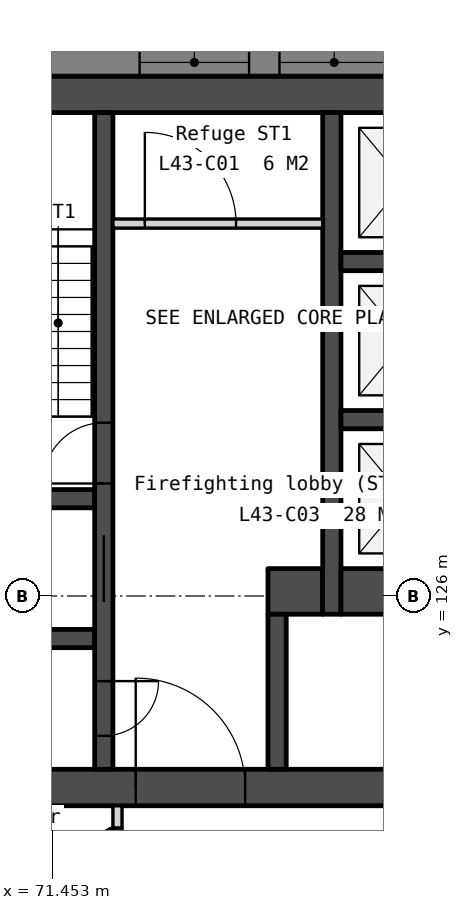
"""IFC4 building model, lengths in metres.
Left out: names, types, materials, properties, quantities, classifications, styles, units other than length and angle.
Written with IfcOpenShell. Run it as: python <this file> out.ifc"""

import sys

from ifc_helpers import new_model, si_unit, direction, frame, frame_2d, origin, place, context, subcontext, project, spatial, polyline, rectangle, outline, extrude, element, fill, save


model = new_model("IFC4")
c1 = context("Model", 3, precision=1e-05, world=origin(), true_north=direction((0.0, 1.0)))
c2 = subcontext(c1, "Body", "Model", "MODEL_VIEW")
j1 = project(units=[si_unit("LENGTHUNIT", "METRE"), si_unit("PLANEANGLEUNIT", "RADIAN")], contexts=[c1])
p1 = place(None, origin())
s1 = spatial("IfcSite", under=j1, at=p1, CompositionType="ELEMENT")
p2 = place(p1, origin())
s2 = spatial("IfcBuilding", under=s1, at=p2, CompositionType="ELEMENT")
p3 = place(p2, frame((0.0, 0.0, 171.5)))
s3 = spatial("IfcBuildingStorey", under=s2, at=p3, CompositionType="ELEMENT", Elevation=171.5)
p4 = place(p3, frame((69.0, 134.25, 0.0), z_axis=(0.0, 0.0, 1.0), x_axis=(1.0, 0.0, 0.0)))
e1 = element("IfcWall", 1, at=p4, inside=s3, PredefinedType="SOLIDWALL", context=c2, shape_type="SweptSolid", body=[
    extrude(rectangle(XDim=22.0, YDim=0.6, at=frame_2d((11.0, 0.0))), origin(), (0.0, 0.0, 1.0), 3.65),
])
p5 = place(p3, frame((69.0, 122.85, 0.0), z_axis=(0.0, 0.0, 1.0), x_axis=(1.0, 0.0, 0.0)))
e2 = element("IfcWall", 2, at=p5, inside=s3, PredefinedType="SOLIDWALL", context=c2, shape_type="SweptSolid", body=[
    extrude(rectangle(XDim=22.0, YDim=0.6, at=frame_2d((11.0, 0.0))), origin(), (0.0, 0.0, 1.0), 3.65),
])
p6 = place(p5, frame((16.375, 0.0, 0.0)))
e3 = element("IfcOpeningElement", 3, at=p6, cuts=e2, PredefinedType="OPENING", context=c2, shape_type="SweptSolid", body=[
    extrude(rectangle(XDim=1.8, YDim=2.1, at=frame_2d((0.9, 1.05))), frame((0.0, 0.31, 0.0), z_axis=(0.0, -1.0, 0.0), x_axis=(1.0, 0.0, 0.0)), (0.0, 0.0, 1.0), 0.62),
])
p7 = place(p5, frame((3.825, 0.0, 0.0)))
e4 = element("IfcOpeningElement", 4, at=p7, cuts=e2, PredefinedType="OPENING", context=c2, shape_type="SweptSolid", body=[
    extrude(rectangle(XDim=1.8, YDim=2.1, at=frame_2d((0.9, 1.05))), frame((0.0, 0.31, 0.0), z_axis=(0.0, -1.0, 0.0), x_axis=(1.0, 0.0, 0.0)), (0.0, 0.0, 1.0), 0.62),
])
p8 = place(p5, frame((12.85, 0.0, 0.0)))
e5 = element("IfcOpeningElement", 5, at=p8, cuts=e2, PredefinedType="OPENING", context=c2, shape_type="SweptSolid", body=[
    extrude(rectangle(XDim=1.5, YDim=2.1, at=frame_2d((0.75, 1.05))), frame((0.0, 0.31, 0.0), z_axis=(0.0, -1.0, 0.0), x_axis=(1.0, 0.0, 0.0)), (0.0, 0.0, 1.0), 0.62),
])
for number, where, z_axis, x_axis in (
    (6, (69.6, 127.6, 0.0), (0.0, 0.0, 1.0), (1.0, 0.0, 0.0)),
    (7, (69.6, 125.3, 0.0), (0.0, 0.0, 1.0), (1.0, 0.0, 0.0)),
):
    element("IfcWall", number, at=place(p3, frame(where, z_axis=z_axis, x_axis=x_axis)), inside=s3, PredefinedType="SOLIDWALL", context=c2, shape_type="SweptSolid", body=[
        extrude(rectangle(XDim=2.55, YDim=0.3, at=frame_2d((1.275, 0.0))), origin(), (0.0, 0.0, 1.0), 3.65),
    ])
p9 = place(p3, frame((72.3, 133.95, 0.0), z_axis=(0.0, 0.0, 1.0), x_axis=(0.0, -1.0, 0.0)))
e8 = element("IfcWall", 8, at=p9, inside=s3, PredefinedType="SOLIDWALL", context=c2, shape_type="SweptSolid", body=[
    extrude(rectangle(XDim=10.8, YDim=0.3, at=frame_2d((5.4, 0.0))), origin(), (0.0, 0.0, 1.0), 3.65),
])
p10 = place(p9, frame((6.95, 0.0, 0.0)))
e9 = element("IfcOpeningElement", 9, at=p10, cuts=e8, PredefinedType="OPENING", context=c2, shape_type="SweptSolid", body=[
    extrude(rectangle(XDim=1.1, YDim=2.1, at=frame_2d((0.55, 1.05))), frame((0.0, 0.16, 0.0), z_axis=(0.0, -1.0, 0.0), x_axis=(1.0, 0.0, 0.0)), (0.0, 0.0, 1.0), 0.32),
])
p11 = place(p9, frame((9.35, 0.0, 0.0)))
e10 = element("IfcOpeningElement", 10, at=p11, cuts=e8, PredefinedType="OPENING", context=c2, shape_type="SweptSolid", body=[
    extrude(rectangle(XDim=0.9, YDim=2.1, at=frame_2d((0.45, 1.05))), frame((0.0, 0.16, 0.0), z_axis=(0.0, -1.0, 0.0), x_axis=(1.0, 0.0, 0.0)), (0.0, 0.0, 1.0), 0.32),
])
p12 = place(p9, frame((5.1, 0.0, 0.0)))
e11 = element("IfcOpeningElement", 11, at=p12, cuts=e8, PredefinedType="OPENING", context=c2, shape_type="SweptSolid", body=[
    extrude(rectangle(XDim=1.0, YDim=2.1, at=frame_2d((0.5, 1.05))), frame((0.0, 0.16, 0.0), z_axis=(0.0, -1.0, 0.0), x_axis=(1.0, 0.0, 0.0)), (0.0, 0.0, 1.0), 0.32),
])
p13 = place(p3, frame((72.45, 132.125, 0.0), z_axis=(0.0, 0.0, 1.0), x_axis=(1.0, 0.0, 0.0)))
e12 = element("IfcWall", 12, at=p13, inside=s3, PredefinedType="PARTITIONING", context=c2, shape_type="SweptSolid", body=[
    extrude(rectangle(XDim=3.45, YDim=0.15, at=frame_2d((1.725, 0.0))), origin(), (0.0, 0.0, 1.0), 3.65),
])
p14 = place(p13, frame((0.525, 0.0, 0.0)))
e13 = element("IfcOpeningElement", 13, at=p14, cuts=e12, PredefinedType="OPENING", context=c2, shape_type="SweptSolid", body=[
    extrude(rectangle(XDim=1.5, YDim=2.1, at=frame_2d((0.75, 1.05))), frame((0.0, 0.085, 0.0), z_axis=(0.0, -1.0, 0.0), x_axis=(1.0, 0.0, 0.0)), (0.0, 0.0, 1.0), 0.17),
])
p15 = place(p3, frame((75.0, 126.075, 0.0), z_axis=(0.0, 0.0, 1.0), x_axis=(1.0, 0.0, 0.0)))
e14 = element("IfcWall", 14, at=p15, inside=s3, PredefinedType="SOLIDWALL", context=c2, shape_type="SweptSolid", body=[
    extrude(rectangle(XDim=0.9, YDim=0.75, at=frame_2d((0.45, 0.0))), origin(), (0.0, 0.0, 1.0), 3.65),
])
p16 = place(p3, frame((75.15, 125.7, 0.0), z_axis=(0.0, 0.0, 1.0), x_axis=(0.0, -1.0, 0.0)))
e15 = element("IfcWall", 15, at=p16, inside=s3, PredefinedType="SOLIDWALL", context=c2, shape_type="SweptSolid", body=[
    extrude(rectangle(XDim=2.55, YDim=0.3, at=frame_2d((1.275, 0.0))), origin(), (0.0, 0.0, 1.0), 3.65),
])
p17 = place(p3, frame((76.05, 133.95, 0.0), z_axis=(0.0, 0.0, 1.0), x_axis=(0.0, -1.0, 0.0)))
e16 = element("IfcWall", 16, at=p17, inside=s3, PredefinedType="SOLIDWALL", context=c2, shape_type="SweptSolid", body=[
    extrude(rectangle(XDim=8.25, YDim=0.3, at=frame_2d((4.125, 0.0))), origin(), (0.0, 0.0, 1.0), 3.65),
])
for number, where, z_axis, x_axis in (
    (17, (76.2, 131.5, 0.0), (0.0, 0.0, 1.0), (1.0, 0.0, 0.0)),
    (18, (76.2, 128.9, 0.0), (0.0, 0.0, 1.0), (1.0, 0.0, 0.0)),
):
    element("IfcWall", number, at=place(p3, frame(where, z_axis=z_axis, x_axis=x_axis)), inside=s3, PredefinedType="SOLIDWALL", context=c2, shape_type="SweptSolid", body=[
        extrude(rectangle(XDim=2.1, YDim=0.3, at=frame_2d((1.05, 0.0))), origin(), (0.0, 0.0, 1.0), 3.65),
    ])
p18 = place(p3, frame((76.2, 126.075, 0.0), z_axis=(0.0, 0.0, 1.0), x_axis=(1.0, 0.0, 0.0)))
e19 = element("IfcWall", 19, at=p18, inside=s3, PredefinedType="SOLIDWALL", context=c2, shape_type="SweptSolid", body=[
    extrude(rectangle(XDim=2.1, YDim=0.75, at=frame_2d((1.05, 0.0))), origin(), (0.0, 0.0, 1.0), 3.65),
])
p19 = place(p3, frame((100.243, 134.775, -0.15), z_axis=(0.0, 0.0, 1.0), x_axis=(-1.0, 0.0, 0.0)))
e20 = element("IfcWall", 20, at=p19, inside=s3, PredefinedType="SOLIDWALL", context=c2, shape_type="SweptSolid", body=[
    extrude(outline(polyline([(40.486, 0.0), (40.486, 3.8), (0.0, 3.8), (0.0, 0.0), (40.486, 0.0)])), frame((0.0, 0.225, 0.0), z_axis=(0.0, -1.0, 0.0), x_axis=(1.0, 0.0, 0.0)), (0.0, 0.0, 1.0), 0.45),
])
p20 = place(p19, frame((3.011, 0.0, 0.95)))
e21 = element("IfcOpeningElement", 21, at=p20, cuts=e20, PredefinedType="OPENING", context=c2, shape_type="SweptSolid", body=[
    extrude(rectangle(XDim=1.8, YDim=2.2, at=frame_2d((0.9, 1.1))), frame((0.0, 0.235, 0.0), z_axis=(0.0, -1.0, 0.0), x_axis=(1.0, 0.0, 0.0)), (0.0, 0.0, 1.0), 0.47),
])
p21 = place(p19, frame((5.311, 0.0, 0.95)))
e22 = element("IfcOpeningElement", 22, at=p21, cuts=e20, PredefinedType="OPENING", context=c2, shape_type="SweptSolid", body=[
    extrude(rectangle(XDim=1.8, YDim=2.2, at=frame_2d((0.9, 1.1))), frame((0.0, 0.235, 0.0), z_axis=(0.0, -1.0, 0.0), x_axis=(1.0, 0.0, 0.0)), (0.0, 0.0, 1.0), 0.47),
])
p22 = place(p19, frame((13.132, 0.0, 0.95)))
e23 = element("IfcOpeningElement", 23, at=p22, cuts=e20, PredefinedType="OPENING", context=c2, shape_type="SweptSolid", body=[
    extrude(rectangle(XDim=1.8, YDim=2.2, at=frame_2d((0.9, 1.1))), frame((0.0, 0.235, 0.0), z_axis=(0.0, -1.0, 0.0), x_axis=(1.0, 0.0, 0.0)), (0.0, 0.0, 1.0), 0.47),
])
p23 = place(p19, frame((15.432, 0.0, 0.95)))
e24 = element("IfcOpeningElement", 24, at=p23, cuts=e20, PredefinedType="OPENING", context=c2, shape_type="SweptSolid", body=[
    extrude(rectangle(XDim=1.8, YDim=2.2, at=frame_2d((0.9, 1.1))), frame((0.0, 0.235, 0.0), z_axis=(0.0, -1.0, 0.0), x_axis=(1.0, 0.0, 0.0)), (0.0, 0.0, 1.0), 0.47),
])
p24 = place(p19, frame((23.254, 0.0, 0.95)))
e25 = element("IfcOpeningElement", 25, at=p24, cuts=e20, PredefinedType="OPENING", context=c2, shape_type="SweptSolid", body=[
    extrude(rectangle(XDim=1.8, YDim=2.2, at=frame_2d((0.9, 1.1))), frame((0.0, 0.235, 0.0), z_axis=(0.0, -1.0, 0.0), x_axis=(1.0, 0.0, 0.0)), (0.0, 0.0, 1.0), 0.47),
])
p25 = place(p19, frame((25.554, 0.0, 0.95)))
e26 = element("IfcOpeningElement", 26, at=p25, cuts=e20, PredefinedType="OPENING", context=c2, shape_type="SweptSolid", body=[
    extrude(rectangle(XDim=1.8, YDim=2.2, at=frame_2d((0.9, 1.1))), frame((0.0, 0.235, 0.0), z_axis=(0.0, -1.0, 0.0), x_axis=(1.0, 0.0, 0.0)), (0.0, 0.0, 1.0), 0.47),
])
p26 = place(p19, frame((33.375, 0.0, 0.95)))
e27 = element("IfcOpeningElement", 27, at=p26, cuts=e20, PredefinedType="OPENING", context=c2, shape_type="SweptSolid", body=[
    extrude(rectangle(XDim=1.8, YDim=2.2, at=frame_2d((0.9, 1.1))), frame((0.0, 0.235, 0.0), z_axis=(0.0, -1.0, 0.0), x_axis=(1.0, 0.0, 0.0)), (0.0, 0.0, 1.0), 0.47),
])
p27 = place(p19, frame((35.675, 0.0, 0.95)))
e28 = element("IfcOpeningElement", 28, at=p27, cuts=e20, PredefinedType="OPENING", context=c2, shape_type="SweptSolid", body=[
    extrude(rectangle(XDim=1.8, YDim=2.2, at=frame_2d((0.9, 1.1))), frame((0.0, 0.235, 0.0), z_axis=(0.0, -1.0, 0.0), x_axis=(1.0, 0.0, 0.0)), (0.0, 0.0, 1.0), 0.47),
])
p28 = place(p3, frame((57.652, 131.129, -0.15), z_axis=(0.0, 0.0, 1.0), x_axis=(0.499997369791, -0.866026922331, 0.0)))
e29 = element("IfcWall", 29, at=p28, inside=s3, PredefinedType="SOLIDWALL", context=c2, shape_type="SweptSolid", body=[
    extrude(outline(polyline([(40.486, 0.0), (40.486, 3.8), (0.0, 3.8), (0.0, 0.0), (40.486, 0.0)])), frame((0.0, 0.225, 0.0), z_axis=(0.0, -1.0, 0.0), x_axis=(1.0, 0.0, 0.0)), (0.0, 0.0, 1.0), 0.45),
])
p29 = place(p28, frame((3.011, 0.0, 0.95)))
e30 = element("IfcOpeningElement", 30, at=p29, cuts=e29, PredefinedType="OPENING", context=c2, shape_type="SweptSolid", body=[
    extrude(rectangle(XDim=1.8, YDim=2.2, at=frame_2d((0.9, 1.1))), frame((0.0, 0.235, 0.0), z_axis=(0.0, -1.0, 0.0), x_axis=(1.0, 0.0, 0.0)), (0.0, 0.0, 1.0), 0.47),
])
p30 = place(p28, frame((5.311, 0.0, 0.95)))
e31 = element("IfcOpeningElement", 31, at=p30, cuts=e29, PredefinedType="OPENING", context=c2, shape_type="SweptSolid", body=[
    extrude(rectangle(XDim=1.8, YDim=2.2, at=frame_2d((0.9, 1.1))), frame((0.0, 0.235, 0.0), z_axis=(0.0, -1.0, 0.0), x_axis=(1.0, 0.0, 0.0)), (0.0, 0.0, 1.0), 0.47),
])
p31 = place(p28, frame((13.132, 0.0, 0.95)))
e32 = element("IfcOpeningElement", 32, at=p31, cuts=e29, PredefinedType="OPENING", context=c2, shape_type="SweptSolid", body=[
    extrude(rectangle(XDim=1.8, YDim=2.2, at=frame_2d((0.9, 1.1))), frame((0.0, 0.235, 0.0), z_axis=(0.0, -1.0, 0.0), x_axis=(1.0, 0.0, 0.0)), (0.0, 0.0, 1.0), 0.47),
])
p32 = place(p28, frame((15.432, 0.0, 0.95)))
e33 = element("IfcOpeningElement", 33, at=p32, cuts=e29, PredefinedType="OPENING", context=c2, shape_type="SweptSolid", body=[
    extrude(rectangle(XDim=1.8, YDim=2.2, at=frame_2d((0.9, 1.1))), frame((0.0, 0.235, 0.0), z_axis=(0.0, -1.0, 0.0), x_axis=(1.0, 0.0, 0.0)), (0.0, 0.0, 1.0), 0.47),
])
p33 = place(p28, frame((23.254, 0.0, 0.95)))
e34 = element("IfcOpeningElement", 34, at=p33, cuts=e29, PredefinedType="OPENING", context=c2, shape_type="SweptSolid", body=[
    extrude(rectangle(XDim=1.8, YDim=2.2, at=frame_2d((0.9, 1.1))), frame((0.0, 0.235, 0.0), z_axis=(0.0, -1.0, 0.0), x_axis=(1.0, 0.0, 0.0)), (0.0, 0.0, 1.0), 0.47),
])
p34 = place(p28, frame((25.554, 0.0, 0.95)))
e35 = element("IfcOpeningElement", 35, at=p34, cuts=e29, PredefinedType="OPENING", context=c2, shape_type="SweptSolid", body=[
    extrude(rectangle(XDim=1.8, YDim=2.2, at=frame_2d((0.9, 1.1))), frame((0.0, 0.235, 0.0), z_axis=(0.0, -1.0, 0.0), x_axis=(1.0, 0.0, 0.0)), (0.0, 0.0, 1.0), 0.47),
])
p35 = place(p28, frame((33.375, 0.0, 0.95)))
e36 = element("IfcOpeningElement", 36, at=p35, cuts=e29, PredefinedType="OPENING", context=c2, shape_type="SweptSolid", body=[
    extrude(rectangle(XDim=1.8, YDim=2.2, at=frame_2d((0.9, 1.1))), frame((0.0, 0.235, 0.0), z_axis=(0.0, -1.0, 0.0), x_axis=(1.0, 0.0, 0.0)), (0.0, 0.0, 1.0), 0.47),
])
p36 = place(p28, frame((35.675, 0.0, 0.95)))
e37 = element("IfcOpeningElement", 37, at=p36, cuts=e29, PredefinedType="OPENING", context=c2, shape_type="SweptSolid", body=[
    extrude(rectangle(XDim=1.8, YDim=2.2, at=frame_2d((0.9, 1.1))), frame((0.0, 0.235, 0.0), z_axis=(0.0, -1.0, 0.0), x_axis=(1.0, 0.0, 0.0)), (0.0, 0.0, 1.0), 0.47),
])
p37 = place(p3, frame((65.438, 118.093, 0.0), z_axis=(0.0, 0.0, 1.0), x_axis=(0.866029768103, 0.499992440702, 0.0)))
e38 = element("IfcWall", 38, at=p37, inside=s3, PredefinedType="PARTITIONING", context=c2, shape_type="SweptSolid", body=[
    extrude(rectangle(XDim=8.089, YDim=0.1, at=frame_2d((4.044, 0.0))), origin(), (0.0, 0.0, 1.0), 3.65),
])
p38 = place(p37, frame((3.594, 0.0, 0.0)))
e39 = element("IfcOpeningElement", 39, at=p38, cuts=e38, PredefinedType="OPENING", context=c2, shape_type="SweptSolid", body=[
    extrude(rectangle(XDim=0.9, YDim=2.1, at=frame_2d((0.45, 1.05))), frame((0.0, 0.06, 0.0), z_axis=(0.0, -1.0, 0.0), x_axis=(1.0, 0.0, 0.0)), (0.0, 0.0, 1.0), 0.12),
])
p39 = place(p3, frame((72.525, 119.875, 0.0), z_axis=(0.0, 0.0, 1.0), x_axis=(0.0, 1.0, 0.0)))
e40 = element("IfcWall", 40, at=p39, inside=s3, PredefinedType="PARTITIONING", context=c2, shape_type="SweptSolid", body=[
    extrude(rectangle(XDim=2.31, YDim=0.15, at=frame_2d((1.155, 0.0))), origin(), (0.0, 0.0, 1.0), 3.65),
])
p40 = place(p3, frame((72.525, 122.185, 0.0), z_axis=(0.0, 0.0, 1.0), x_axis=(0.0, 1.0, 0.0)))
e41 = element("IfcWall", 41, at=p40, inside=s3, PredefinedType="PARTITIONING", context=c2, shape_type="SweptSolid", body=[
    extrude(rectangle(XDim=0.365, YDim=0.15, at=frame_2d((0.183, 0.0))), origin(), (0.0, 0.0, 1.0), 3.65),
])
p41 = place(p10, origin())
e42 = element("IfcDoor", 42, at=p41, inside=s3, OperationType="SLIDING_TO_LEFT", PredefinedType="DOOR", context=c2, shape_type="SweptSolid", body=[
    extrude(rectangle(XDim=1.1, YDim=2.1, at=frame_2d((0.55, 1.05))), frame((0.0, 0.025, 0.0), z_axis=(0.0, -1.0, 0.0), x_axis=(1.0, 0.0, 0.0)), (0.0, 0.0, 1.0), 0.05),
])
fill(e9, e42)
p42 = place(p7, origin())
e43 = element("IfcDoor", 43, at=p42, inside=s3, OperationType="DOUBLE_DOOR_DOUBLE_SWING", PredefinedType="DOOR", context=c2, shape_type="SweptSolid", body=[
    extrude(rectangle(XDim=1.8, YDim=2.1, at=frame_2d((0.9, 1.05))), frame((0.0, 0.025, 0.0), z_axis=(0.0, -1.0, 0.0), x_axis=(1.0, 0.0, 0.0)), (0.0, 0.0, 1.0), 0.05),
])
fill(e4, e43)
p43 = place(p14, origin())
e44 = element("IfcDoor", 44, at=p43, inside=s3, OperationType="DOUBLE_DOOR_DOUBLE_SWING", PredefinedType="DOOR", context=c2, shape_type="SweptSolid", body=[
    extrude(rectangle(XDim=1.5, YDim=2.1, at=frame_2d((0.75, 1.05))), frame((0.0, 0.025, 0.0), z_axis=(0.0, -1.0, 0.0), x_axis=(1.0, 0.0, 0.0)), (0.0, 0.0, 1.0), 0.05),
])
fill(e13, e44)
p44 = place(p11, origin())
e45 = element("IfcDoor", 45, at=p44, inside=s3, OperationType="SINGLE_SWING_LEFT", PredefinedType="DOOR", context=c2, shape_type="SweptSolid", body=[
    extrude(rectangle(XDim=0.9, YDim=2.1, at=frame_2d((0.45, 1.05))), frame((0.0, 0.025, 0.0), z_axis=(0.0, -1.0, 0.0), x_axis=(1.0, 0.0, 0.0)), (0.0, 0.0, 1.0), 0.05),
])
fill(e10, e45)
p45 = place(p12, origin())
e46 = element("IfcDoor", 46, at=p45, inside=s3, OperationType="SINGLE_SWING_RIGHT", PredefinedType="DOOR", context=c2, shape_type="SweptSolid", body=[
    extrude(rectangle(XDim=1.0, YDim=2.1, at=frame_2d((0.5, 1.05))), frame((0.0, 0.025, 0.0), z_axis=(0.0, -1.0, 0.0), x_axis=(1.0, 0.0, 0.0)), (0.0, 0.0, 1.0), 0.05),
])
fill(e11, e46)
p46 = place(p24, origin())
e47 = element("IfcWindow", 47, at=p46, inside=s3, PartitioningType="SINGLE_PANEL", PredefinedType="WINDOW", context=c2, shape_type="SweptSolid", body=[
    extrude(rectangle(XDim=1.8, YDim=2.2, at=frame_2d((0.9, 1.1))), frame((0.0, 0.03, 0.0), z_axis=(0.0, -1.0, 0.0), x_axis=(1.0, 0.0, 0.0)), (0.0, 0.0, 1.0), 0.06),
])
fill(e25, e47)
p47 = place(p25, origin())
e48 = element("IfcWindow", 48, at=p47, inside=s3, PartitioningType="SINGLE_PANEL", PredefinedType="WINDOW", context=c2, shape_type="SweptSolid", body=[
    extrude(rectangle(XDim=1.8, YDim=2.2, at=frame_2d((0.9, 1.1))), frame((0.0, 0.03, 0.0), z_axis=(0.0, -1.0, 0.0), x_axis=(1.0, 0.0, 0.0)), (0.0, 0.0, 1.0), 0.06),
])
fill(e26, e48)
save(model, sys.argv[1])
